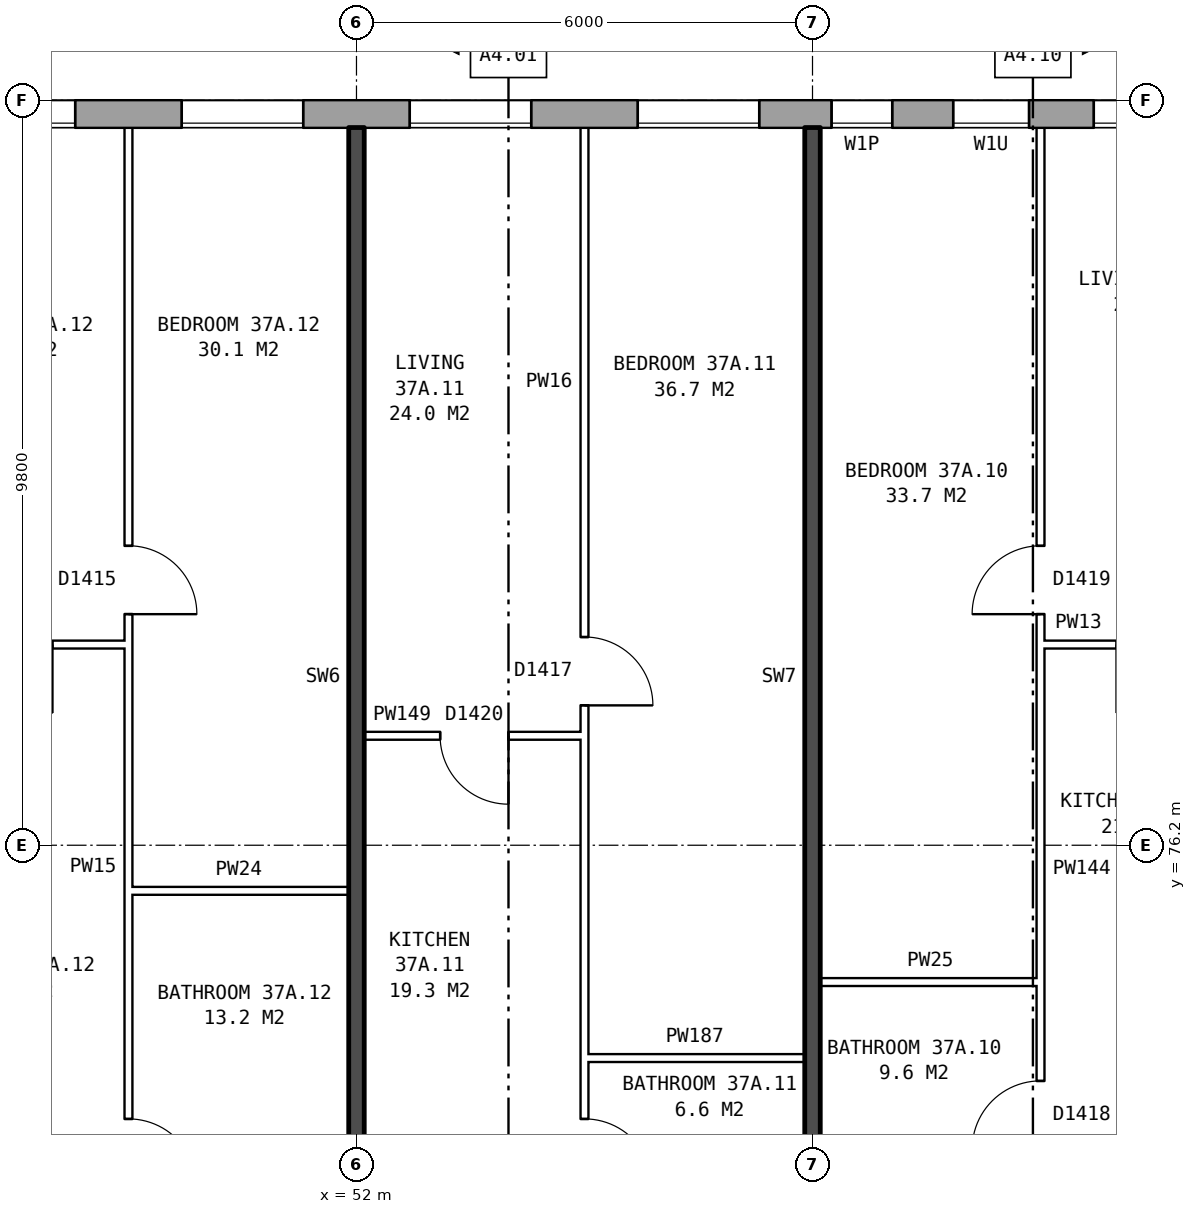
"""IFC4 building model, lengths in metres.
Left out: names, types, materials, properties, quantities, classifications, styles, units other than length and angle.
Written with IfcOpenShell. Run it as: python <this file> out.ifc"""

import sys

from ifc_helpers import new_model, si_unit, direction, frame, frame_2d, origin, place, context, subcontext, project, spatial, rectangle, extrude, element, fill, save


model = new_model("IFC4")
c1 = context("Model", 3, precision=1e-05, world=origin(), true_north=direction((0.0, 1.0)))
c2 = subcontext(c1, "Body", "Model", "MODEL_VIEW")
j1 = project(units=[si_unit("LENGTHUNIT", "METRE"), si_unit("PLANEANGLEUNIT", "RADIAN")], contexts=[c1])
p1 = place(None, origin())
s1 = spatial("IfcSite", under=j1, at=p1, CompositionType="ELEMENT")
p2 = place(p1, origin())
s2 = spatial("IfcBuilding", under=s1, at=p2, CompositionType="ELEMENT")
p3 = place(p2, frame((0.0, 0.0, 133.0)))
s3 = spatial("IfcBuildingStorey", under=s2, at=p3, CompositionType="ELEMENT", Elevation=133.0)
p4 = place(p3, frame((72.925, 85.82, 0.0), z_axis=(0.0, 0.0, 1.0), x_axis=(-1.0, 0.0, 0.0)))
e1 = element("IfcWall", 1, at=p4, inside=s3, PredefinedType="STANDARD", context=c2, shape_type="SweptSolid", body=[
    extrude(rectangle(XDim=43.101, YDim=0.36, at=frame_2d((21.55, 0.0))), origin(), (0.0, 0.0, 1.0), 2.85),
])
p5 = place(p4, frame((0.625, 0.0, 0.8)))
e2 = element("IfcOpeningElement", 2, at=p5, cuts=e1, PredefinedType="OPENING", context=c2, shape_type="SweptSolid", body=[
    extrude(rectangle(XDim=1.6, YDim=1.8, at=frame_2d((0.8, 0.9))), frame((0.0, 0.19, 0.0), z_axis=(0.0, -1.0, 0.0), x_axis=(1.0, 0.0, 0.0)), (0.0, 0.0, 1.0), 0.38),
])
p6 = place(p4, frame((3.625, 0.0, 0.8)))
e3 = element("IfcOpeningElement", 3, at=p6, cuts=e1, PredefinedType="OPENING", context=c2, shape_type="SweptSolid", body=[
    extrude(rectangle(XDim=1.6, YDim=1.8, at=frame_2d((0.8, 0.9))), frame((0.0, 0.19, 0.0), z_axis=(0.0, -1.0, 0.0), x_axis=(1.0, 0.0, 0.0)), (0.0, 0.0, 1.0), 0.38),
])
p7 = place(p4, frame((6.625, 0.0, 0.8)))
e4 = element("IfcOpeningElement", 4, at=p7, cuts=e1, PredefinedType="OPENING", context=c2, shape_type="SweptSolid", body=[
    extrude(rectangle(XDim=1.6, YDim=1.8, at=frame_2d((0.8, 0.9))), frame((0.0, 0.19, 0.0), z_axis=(0.0, -1.0, 0.0), x_axis=(1.0, 0.0, 0.0)), (0.0, 0.0, 1.0), 0.38),
])
p8 = place(p4, frame((9.625, 0.0, 0.8)))
e5 = element("IfcOpeningElement", 5, at=p8, cuts=e1, PredefinedType="OPENING", context=c2, shape_type="SweptSolid", body=[
    extrude(rectangle(XDim=1.6, YDim=1.8, at=frame_2d((0.8, 0.9))), frame((0.0, 0.19, 0.0), z_axis=(0.0, -1.0, 0.0), x_axis=(1.0, 0.0, 0.0)), (0.0, 0.0, 1.0), 0.38),
])
p9 = place(p4, frame((12.075, 0.0, 1.65)))
e6 = element("IfcOpeningElement", 6, at=p9, cuts=e1, PredefinedType="OPENING", context=c2, shape_type="SweptSolid", body=[
    extrude(rectangle(XDim=1.0, YDim=0.9, at=frame_2d((0.5, 0.45))), frame((0.0, 0.19, 0.0), z_axis=(0.0, -1.0, 0.0), x_axis=(1.0, 0.0, 0.0)), (0.0, 0.0, 1.0), 0.38),
])
p10 = place(p4, frame((15.625, 0.0, 0.8)))
e7 = element("IfcOpeningElement", 7, at=p10, cuts=e1, PredefinedType="OPENING", context=c2, shape_type="SweptSolid", body=[
    extrude(rectangle(XDim=1.6, YDim=1.8, at=frame_2d((0.8, 0.9))), frame((0.0, 0.19, 0.0), z_axis=(0.0, -1.0, 0.0), x_axis=(1.0, 0.0, 0.0)), (0.0, 0.0, 1.0), 0.38),
])
p11 = place(p4, frame((18.625, 0.0, 0.8)))
e8 = element("IfcOpeningElement", 8, at=p11, cuts=e1, PredefinedType="OPENING", context=c2, shape_type="SweptSolid", body=[
    extrude(rectangle(XDim=1.6, YDim=1.8, at=frame_2d((0.8, 0.9))), frame((0.0, 0.19, 0.0), z_axis=(0.0, -1.0, 0.0), x_axis=(1.0, 0.0, 0.0)), (0.0, 0.0, 1.0), 0.38),
])
p12 = place(p4, frame((21.625, 0.0, 0.8)))
e9 = element("IfcOpeningElement", 9, at=p12, cuts=e1, PredefinedType="OPENING", context=c2, shape_type="SweptSolid", body=[
    extrude(rectangle(XDim=1.6, YDim=1.8, at=frame_2d((0.8, 0.9))), frame((0.0, 0.19, 0.0), z_axis=(0.0, -1.0, 0.0), x_axis=(1.0, 0.0, 0.0)), (0.0, 0.0, 1.0), 0.38),
])
p13 = place(p4, frame((24.625, 0.0, 0.8)))
e10 = element("IfcOpeningElement", 10, at=p13, cuts=e1, PredefinedType="OPENING", context=c2, shape_type="SweptSolid", body=[
    extrude(rectangle(XDim=1.6, YDim=1.8, at=frame_2d((0.8, 0.9))), frame((0.0, 0.19, 0.0), z_axis=(0.0, -1.0, 0.0), x_axis=(1.0, 0.0, 0.0)), (0.0, 0.0, 1.0), 0.38),
])
p14 = place(p4, frame((27.125, 0.0, 0.8)))
e11 = element("IfcOpeningElement", 11, at=p14, cuts=e1, PredefinedType="OPENING", context=c2, shape_type="SweptSolid", body=[
    extrude(rectangle(XDim=0.6, YDim=1.8, at=frame_2d((0.3, 0.9))), frame((0.0, 0.19, 0.0), z_axis=(0.0, -1.0, 0.0), x_axis=(1.0, 0.0, 0.0)), (0.0, 0.0, 1.0), 0.38),
])
p15 = place(p4, frame((30.625, 0.0, 0.8)))
e12 = element("IfcOpeningElement", 12, at=p15, cuts=e1, PredefinedType="OPENING", context=c2, shape_type="SweptSolid", body=[
    extrude(rectangle(XDim=1.6, YDim=1.8, at=frame_2d((0.8, 0.9))), frame((0.0, 0.19, 0.0), z_axis=(0.0, -1.0, 0.0), x_axis=(1.0, 0.0, 0.0)), (0.0, 0.0, 1.0), 0.38),
])
p16 = place(p4, frame((33.625, 0.0, 0.8)))
e13 = element("IfcOpeningElement", 13, at=p16, cuts=e1, PredefinedType="OPENING", context=c2, shape_type="SweptSolid", body=[
    extrude(rectangle(XDim=1.6, YDim=1.8, at=frame_2d((0.8, 0.9))), frame((0.0, 0.19, 0.0), z_axis=(0.0, -1.0, 0.0), x_axis=(1.0, 0.0, 0.0)), (0.0, 0.0, 1.0), 0.38),
])
p17 = place(p4, frame((36.625, 0.0, 0.8)))
e14 = element("IfcOpeningElement", 14, at=p17, cuts=e1, PredefinedType="OPENING", context=c2, shape_type="SweptSolid", body=[
    extrude(rectangle(XDim=1.6, YDim=1.8, at=frame_2d((0.8, 0.9))), frame((0.0, 0.19, 0.0), z_axis=(0.0, -1.0, 0.0), x_axis=(1.0, 0.0, 0.0)), (0.0, 0.0, 1.0), 0.38),
])
p18 = place(p4, frame((39.625, 0.0, 0.8)))
e15 = element("IfcOpeningElement", 15, at=p18, cuts=e1, PredefinedType="OPENING", context=c2, shape_type="SweptSolid", body=[
    extrude(rectangle(XDim=1.6, YDim=1.8, at=frame_2d((0.8, 0.9))), frame((0.0, 0.19, 0.0), z_axis=(0.0, -1.0, 0.0), x_axis=(1.0, 0.0, 0.0)), (0.0, 0.0, 1.0), 0.38),
])
p19 = place(p4, frame((13.875, 0.0, 0.15)))
e16 = element("IfcOpeningElement", 16, at=p19, cuts=e1, PredefinedType="OPENING", context=c2, shape_type="SweptSolid", body=[
    extrude(rectangle(XDim=0.8, YDim=1.2, at=frame_2d((0.4, 0.6))), frame((0.0, 0.19, 0.0), z_axis=(0.0, -1.0, 0.0), x_axis=(1.0, 0.0, 0.0)), (0.0, 0.0, 1.0), 0.38),
])
p20 = place(p4, frame((28.025, 0.0, 0.8)))
e17 = element("IfcOpeningElement", 17, at=p20, cuts=e1, PredefinedType="OPENING", context=c2, shape_type="SweptSolid", body=[
    extrude(rectangle(XDim=0.8, YDim=0.9, at=frame_2d((0.4, 0.45))), frame((0.0, 0.19, 0.0), z_axis=(0.0, -1.0, 0.0), x_axis=(1.0, 0.0, 0.0)), (0.0, 0.0, 1.0), 0.38),
])
for number, where, z_axis, x_axis in (
    (18, (55.0, 73.4, 0.0), (0.0, 0.0, 1.0), (1.0, 0.0, 0.0)),
    (19, (58.1, 74.4, 0.0), (0.0, 0.0, 1.0), (1.0, 0.0, 0.0)),
    (20, (49.0, 75.6, 0.0), (0.0, 0.0, 1.0), (1.0, 0.0, 0.0)),
):
    element("IfcWall", number, at=place(p3, frame(where, z_axis=z_axis, x_axis=x_axis)), inside=s3, PredefinedType="PARTITIONING", context=c2, shape_type="SweptSolid", body=[
        extrude(rectangle(XDim=2.9, YDim=0.1, at=frame_2d((1.45, 0.0))), origin(), (0.0, 0.0, 1.0), 2.85),
    ])
p21 = place(p3, frame((52.1, 77.64, 0.0), z_axis=(0.0, 0.0, 1.0), x_axis=(1.0, 0.0, 0.0)))
e21 = element("IfcWall", 21, at=p21, inside=s3, PredefinedType="PARTITIONING", context=c2, shape_type="SweptSolid", body=[
    extrude(rectangle(XDim=2.9, YDim=0.1, at=frame_2d((1.45, 0.0))), origin(), (0.0, 0.0, 1.0), 2.85),
])
p22 = place(p21, frame((1.0, 0.0, 0.0)))
e22 = element("IfcOpeningElement", 22, at=p22, cuts=e21, PredefinedType="OPENING", context=c2, shape_type="SweptSolid", body=[
    extrude(rectangle(XDim=0.9, YDim=2.1, at=frame_2d((0.45, 1.05))), frame((0.0, 0.06, 0.0), z_axis=(0.0, -1.0, 0.0), x_axis=(1.0, 0.0, 0.0)), (0.0, 0.0, 1.0), 0.12),
])
p23 = place(p3, frame((46.1, 78.84, 0.0), z_axis=(0.0, 0.0, 1.0), x_axis=(1.0, 0.0, 0.0)))
e23 = element("IfcWall", 23, at=p23, inside=s3, PredefinedType="PARTITIONING", context=c2, shape_type="SweptSolid", body=[
    extrude(rectangle(XDim=2.9, YDim=0.1, at=frame_2d((1.45, 0.0))), origin(), (0.0, 0.0, 1.0), 2.85),
])
p24 = place(p23, frame((1.0, 0.0, 0.0)))
e24 = element("IfcOpeningElement", 24, at=p24, cuts=e23, PredefinedType="OPENING", context=c2, shape_type="SweptSolid", body=[
    extrude(rectangle(XDim=0.9, YDim=2.1, at=frame_2d((0.45, 1.05))), frame((0.0, 0.06, 0.0), z_axis=(0.0, -1.0, 0.0), x_axis=(1.0, 0.0, 0.0)), (0.0, 0.0, 1.0), 0.12),
])
p25 = place(p3, frame((61.0, 78.84, 0.0), z_axis=(0.0, 0.0, 1.0), x_axis=(1.0, 0.0, 0.0)))
e25 = element("IfcWall", 25, at=p25, inside=s3, PredefinedType="PARTITIONING", context=c2, shape_type="SweptSolid", body=[
    extrude(rectangle(XDim=2.9, YDim=0.1, at=frame_2d((1.45, 0.0))), origin(), (0.0, 0.0, 1.0), 2.85),
])
p26 = place(p25, frame((1.0, 0.0, 0.0)))
e26 = element("IfcOpeningElement", 26, at=p26, cuts=e25, PredefinedType="OPENING", context=c2, shape_type="SweptSolid", body=[
    extrude(rectangle(XDim=0.9, YDim=2.1, at=frame_2d((0.45, 1.05))), frame((0.0, 0.06, 0.0), z_axis=(0.0, -1.0, 0.0), x_axis=(1.0, 0.0, 0.0)), (0.0, 0.0, 1.0), 0.12),
])
p27 = place(p3, frame((49.0, 71.3, 0.0), z_axis=(0.0, 0.0, 1.0), x_axis=(0.0, 1.0, 0.0)))
e27 = element("IfcWall", 27, at=p27, inside=s3, PredefinedType="PARTITIONING", context=c2, shape_type="SweptSolid", body=[
    extrude(rectangle(XDim=14.34, YDim=0.1, at=frame_2d((7.17, 0.0))), origin(), (0.0, 0.0, 1.0), 2.85),
])
p28 = place(p27, frame((7.94, 0.0, 0.0)))
e28 = element("IfcOpeningElement", 28, at=p28, cuts=e27, PredefinedType="OPENING", context=c2, shape_type="SweptSolid", body=[
    extrude(rectangle(XDim=0.9, YDim=2.1, at=frame_2d((0.45, 1.05))), frame((0.0, 0.06, 0.0), z_axis=(0.0, -1.0, 0.0), x_axis=(1.0, 0.0, 0.0)), (0.0, 0.0, 1.0), 0.12),
])
p29 = place(p27, frame((0.4, 0.0, 0.0)))
e29 = element("IfcOpeningElement", 29, at=p29, cuts=e27, PredefinedType="OPENING", context=c2, shape_type="SweptSolid", body=[
    extrude(rectangle(XDim=0.9, YDim=2.1, at=frame_2d((0.45, 1.05))), frame((0.0, 0.06, 0.0), z_axis=(0.0, -1.0, 0.0), x_axis=(1.0, 0.0, 0.0)), (0.0, 0.0, 1.0), 0.12),
])
p30 = place(p3, frame((52.0, 71.2, 0.0), z_axis=(0.0, 0.0, 1.0), x_axis=(0.0, 1.0, 0.0)))
e30 = element("IfcWall", 30, at=p30, inside=s3, PredefinedType="SOLIDWALL", context=c2, shape_type="SweptSolid", body=[
    extrude(rectangle(XDim=14.44, YDim=0.2, at=frame_2d((7.22, 0.0))), origin(), (0.0, 0.0, 1.0), 2.85),
])
p31 = place(p3, frame((55.0, 71.3, 0.0), z_axis=(0.0, 0.0, 1.0), x_axis=(0.0, 1.0, 0.0)))
e31 = element("IfcWall", 31, at=p31, inside=s3, PredefinedType="PARTITIONING", context=c2, shape_type="SweptSolid", body=[
    extrude(rectangle(XDim=14.34, YDim=0.1, at=frame_2d((7.17, 0.0))), origin(), (0.0, 0.0, 1.0), 2.85),
])
p32 = place(p31, frame((6.74, 0.0, 0.0)))
e32 = element("IfcOpeningElement", 32, at=p32, cuts=e31, PredefinedType="OPENING", context=c2, shape_type="SweptSolid", body=[
    extrude(rectangle(XDim=0.9, YDim=2.1, at=frame_2d((0.45, 1.05))), frame((0.0, 0.06, 0.0), z_axis=(0.0, -1.0, 0.0), x_axis=(1.0, 0.0, 0.0)), (0.0, 0.0, 1.0), 0.12),
])
p33 = place(p31, frame((0.4, 0.0, 0.0)))
e33 = element("IfcOpeningElement", 33, at=p33, cuts=e31, PredefinedType="OPENING", context=c2, shape_type="SweptSolid", body=[
    extrude(rectangle(XDim=0.9, YDim=2.1, at=frame_2d((0.45, 1.05))), frame((0.0, 0.06, 0.0), z_axis=(0.0, -1.0, 0.0), x_axis=(1.0, 0.0, 0.0)), (0.0, 0.0, 1.0), 0.12),
])
p34 = place(p3, frame((58.0, 71.2, 0.0), z_axis=(0.0, 0.0, 1.0), x_axis=(0.0, 1.0, 0.0)))
e34 = element("IfcWall", 34, at=p34, inside=s3, PredefinedType="SOLIDWALL", context=c2, shape_type="SweptSolid", body=[
    extrude(rectangle(XDim=14.44, YDim=0.2, at=frame_2d((7.22, 0.0))), origin(), (0.0, 0.0, 1.0), 2.85),
])
p35 = place(p3, frame((61.0, 71.3, 0.0), z_axis=(0.0, 0.0, 1.0), x_axis=(0.0, 1.0, 0.0)))
e35 = element("IfcWall", 35, at=p35, inside=s3, PredefinedType="PARTITIONING", context=c2, shape_type="SweptSolid", body=[
    extrude(rectangle(XDim=14.34, YDim=0.1, at=frame_2d((7.17, 0.0))), origin(), (0.0, 0.0, 1.0), 2.85),
])
p36 = place(p35, frame((7.94, 0.0, 0.0)))
e36 = element("IfcOpeningElement", 36, at=p36, cuts=e35, PredefinedType="OPENING", context=c2, shape_type="SweptSolid", body=[
    extrude(rectangle(XDim=0.9, YDim=2.1, at=frame_2d((0.45, 1.05))), frame((0.0, 0.06, 0.0), z_axis=(0.0, -1.0, 0.0), x_axis=(1.0, 0.0, 0.0)), (0.0, 0.0, 1.0), 0.12),
])
p37 = place(p35, frame((0.9, 0.0, 0.0)))
e37 = element("IfcOpeningElement", 37, at=p37, cuts=e35, PredefinedType="OPENING", context=c2, shape_type="SweptSolid", body=[
    extrude(rectangle(XDim=0.9, YDim=2.1, at=frame_2d((0.45, 1.05))), frame((0.0, 0.06, 0.0), z_axis=(0.0, -1.0, 0.0), x_axis=(1.0, 0.0, 0.0)), (0.0, 0.0, 1.0), 0.12),
])
p38 = place(p8, origin())
e38 = element("IfcWindow", 38, at=p38, inside=s3, PartitioningType="SINGLE_PANEL", PredefinedType="WINDOW", context=c2, shape_type="SweptSolid", body=[
    extrude(rectangle(XDim=1.6, YDim=1.8, at=frame_2d((0.8, 0.9))), frame((0.0, 0.15, 0.0), z_axis=(0.0, -1.0, 0.0), x_axis=(1.0, 0.0, 0.0)), (0.0, 0.0, 1.0), 0.06),
])
fill(e5, e38)
p39 = place(p9, origin())
e39 = element("IfcWindow", 39, at=p39, inside=s3, PartitioningType="SINGLE_PANEL", PredefinedType="WINDOW", context=c2, shape_type="SweptSolid", body=[
    extrude(rectangle(XDim=1.0, YDim=0.9, at=frame_2d((0.5, 0.45))), frame((0.0, 0.15, 0.0), z_axis=(0.0, -1.0, 0.0), x_axis=(1.0, 0.0, 0.0)), (0.0, 0.0, 1.0), 0.06),
])
fill(e6, e39)
p40 = place(p10, origin())
e40 = element("IfcWindow", 40, at=p40, inside=s3, PartitioningType="SINGLE_PANEL", PredefinedType="WINDOW", context=c2, shape_type="SweptSolid", body=[
    extrude(rectangle(XDim=1.6, YDim=1.8, at=frame_2d((0.8, 0.9))), frame((0.0, 0.15, 0.0), z_axis=(0.0, -1.0, 0.0), x_axis=(1.0, 0.0, 0.0)), (0.0, 0.0, 1.0), 0.06),
])
fill(e7, e40)
p41 = place(p11, origin())
e41 = element("IfcWindow", 41, at=p41, inside=s3, PartitioningType="SINGLE_PANEL", PredefinedType="WINDOW", context=c2, shape_type="SweptSolid", body=[
    extrude(rectangle(XDim=1.6, YDim=1.8, at=frame_2d((0.8, 0.9))), frame((0.0, 0.15, 0.0), z_axis=(0.0, -1.0, 0.0), x_axis=(1.0, 0.0, 0.0)), (0.0, 0.0, 1.0), 0.06),
])
fill(e8, e41)
p42 = place(p12, origin())
e42 = element("IfcWindow", 42, at=p42, inside=s3, PartitioningType="SINGLE_PANEL", PredefinedType="WINDOW", context=c2, shape_type="SweptSolid", body=[
    extrude(rectangle(XDim=1.6, YDim=1.8, at=frame_2d((0.8, 0.9))), frame((0.0, 0.15, 0.0), z_axis=(0.0, -1.0, 0.0), x_axis=(1.0, 0.0, 0.0)), (0.0, 0.0, 1.0), 0.06),
])
fill(e9, e42)
p43 = place(p13, origin())
e43 = element("IfcWindow", 43, at=p43, inside=s3, PartitioningType="SINGLE_PANEL", PredefinedType="WINDOW", context=c2, shape_type="SweptSolid", body=[
    extrude(rectangle(XDim=1.6, YDim=1.8, at=frame_2d((0.8, 0.9))), frame((0.0, 0.15, 0.0), z_axis=(0.0, -1.0, 0.0), x_axis=(1.0, 0.0, 0.0)), (0.0, 0.0, 1.0), 0.06),
])
fill(e10, e43)
p44 = place(p36, origin())
e44 = element("IfcDoor", 44, at=p44, inside=s3, OperationType="SINGLE_SWING_LEFT", PredefinedType="DOOR", context=c2, shape_type="SweptSolid", body=[
    extrude(rectangle(XDim=0.9, YDim=2.1, at=frame_2d((0.45, 1.05))), frame((0.0, 0.025, 0.0), z_axis=(0.0, -1.0, 0.0), x_axis=(1.0, 0.0, 0.0)), (0.0, 0.0, 1.0), 0.05),
])
fill(e36, e44)
p45 = place(p37, origin())
e45 = element("IfcDoor", 45, at=p45, inside=s3, OperationType="SINGLE_SWING_LEFT", PredefinedType="DOOR", context=c2, shape_type="SweptSolid", body=[
    extrude(rectangle(XDim=0.9, YDim=2.1, at=frame_2d((0.45, 1.05))), frame((0.0, 0.025, 0.0), z_axis=(0.0, -1.0, 0.0), x_axis=(1.0, 0.0, 0.0)), (0.0, 0.0, 1.0), 0.05),
])
fill(e37, e45)
p46 = place(p32, frame((0.9, 0.0, 0.0), z_axis=(0.0, 0.0, 1.0), x_axis=(-1.0, 0.0, 0.0)))
e46 = element("IfcDoor", 46, at=p46, inside=s3, OperationType="SINGLE_SWING_RIGHT", PredefinedType="DOOR", context=c2, shape_type="SweptSolid", body=[
    extrude(rectangle(XDim=0.9, YDim=2.1, at=frame_2d((0.45, 1.05))), frame((0.0, 0.025, 0.0), z_axis=(0.0, -1.0, 0.0), x_axis=(1.0, 0.0, 0.0)), (0.0, 0.0, 1.0), 0.05),
])
fill(e32, e46)
p47 = place(p22, frame((0.9, 0.0, 0.0), z_axis=(0.0, 0.0, 1.0), x_axis=(-1.0, 0.0, 0.0)))
e47 = element("IfcDoor", 47, at=p47, inside=s3, OperationType="SINGLE_SWING_LEFT", PredefinedType="DOOR", context=c2, shape_type="SweptSolid", body=[
    extrude(rectangle(XDim=0.9, YDim=2.1, at=frame_2d((0.45, 1.05))), frame((0.0, 0.025, 0.0), z_axis=(0.0, -1.0, 0.0), x_axis=(1.0, 0.0, 0.0)), (0.0, 0.0, 1.0), 0.05),
])
fill(e22, e47)
p48 = place(p33, frame((0.9, 0.0, 0.0), z_axis=(0.0, 0.0, 1.0), x_axis=(-1.0, 0.0, 0.0)))
e48 = element("IfcDoor", 48, at=p48, inside=s3, OperationType="SINGLE_SWING_RIGHT", PredefinedType="DOOR", context=c2, shape_type="SweptSolid", body=[
    extrude(rectangle(XDim=0.9, YDim=2.1, at=frame_2d((0.45, 1.05))), frame((0.0, 0.025, 0.0), z_axis=(0.0, -1.0, 0.0), x_axis=(1.0, 0.0, 0.0)), (0.0, 0.0, 1.0), 0.05),
])
fill(e33, e48)
p49 = place(p28, frame((0.9, 0.0, 0.0), z_axis=(0.0, 0.0, 1.0), x_axis=(-1.0, 0.0, 0.0)))
e49 = element("IfcDoor", 49, at=p49, inside=s3, OperationType="SINGLE_SWING_RIGHT", PredefinedType="DOOR", context=c2, shape_type="SweptSolid", body=[
    extrude(rectangle(XDim=0.9, YDim=2.1, at=frame_2d((0.45, 1.05))), frame((0.0, 0.025, 0.0), z_axis=(0.0, -1.0, 0.0), x_axis=(1.0, 0.0, 0.0)), (0.0, 0.0, 1.0), 0.05),
])
fill(e28, e49)
p50 = place(p29, frame((0.9, 0.0, 0.0), z_axis=(0.0, 0.0, 1.0), x_axis=(-1.0, 0.0, 0.0)))
e50 = element("IfcDoor", 50, at=p50, inside=s3, OperationType="SINGLE_SWING_RIGHT", PredefinedType="DOOR", context=c2, shape_type="SweptSolid", body=[
    extrude(rectangle(XDim=0.9, YDim=2.1, at=frame_2d((0.45, 1.05))), frame((0.0, 0.025, 0.0), z_axis=(0.0, -1.0, 0.0), x_axis=(1.0, 0.0, 0.0)), (0.0, 0.0, 1.0), 0.05),
])
fill(e29, e50)
p51 = place(p19, origin())
e51 = element("IfcWindow", 51, at=p51, inside=s3, PartitioningType="SINGLE_PANEL", PredefinedType="WINDOW", context=c2, shape_type="SweptSolid", body=[
    extrude(rectangle(XDim=0.8, YDim=1.2, at=frame_2d((0.4, 0.6))), frame((0.0, 0.15, 0.0), z_axis=(0.0, -1.0, 0.0), x_axis=(1.0, 0.0, 0.0)), (0.0, 0.0, 1.0), 0.06),
])
fill(e16, e51)
save(model, sys.argv[1])
